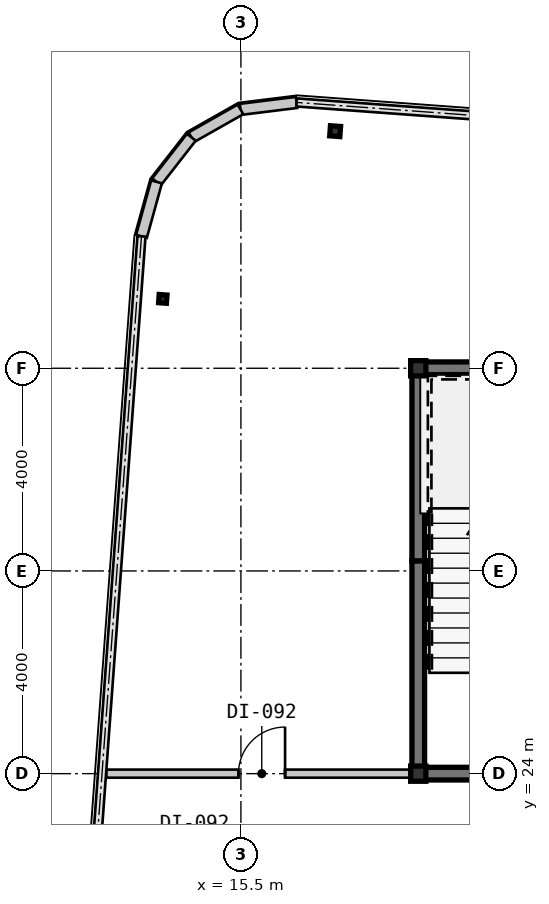
"""IFC4 building model, lengths in metres.
Left out: names, types, materials, properties, quantities, classifications, styles, units other than length and angle.
Written with IfcOpenShell. Run it as: python <this file> out.ifc"""

import sys

from ifc_helpers import new_model, si_unit, direction, frame, frame_2d, origin, origin_2d, place, context, subcontext, project, spatial, rectangle, hollow_rectangle, i_section, extrude, source, transform, mapped, element, fill, save


model = new_model("IFC4")
c1 = context("Model", 3, precision=1e-05, world=origin(), true_north=direction((0.0, 1.0)))
c2 = subcontext(c1, "Body", "Model", "MODEL_VIEW")
j1 = project(units=[si_unit("LENGTHUNIT", "METRE"), si_unit("PLANEANGLEUNIT", "RADIAN")], contexts=[c1])
p1 = place(None, origin())
s1 = spatial("IfcSite", under=j1, at=p1, CompositionType="ELEMENT")
p2 = place(p1, origin())
s2 = spatial("IfcBuilding", under=s1, at=p2, CompositionType="ELEMENT")
p3 = place(p2, frame((0.0, 0.0, 214.55)))
s3 = spatial("IfcBuildingStorey", under=s2, at=p3, CompositionType="ELEMENT", Elevation=214.55)
m1 = source(origin(), c2, "Body", "SweptSolid", [
    extrude(hollow_rectangle(XDim=0.3, YDim=0.3, WallThickness=0.012, at=origin_2d()), origin(), (0.0, 0.0, 1.0), 3.15),
])
for number, where, z_axis, x_axis in (
    (1, (19.0, 24.0, 0.0), (0.0, 0.0, 1.0), (1.0, 0.0, 0.0)),
    (2, (19.0, 32.0, 0.0), (0.0, 0.0, 1.0), (1.0, 0.0, 0.0)),
):
    element("IfcColumn", number, at=place(p3, frame(where, z_axis=z_axis, x_axis=x_axis)), inside=s3, PredefinedType="COLUMN", context=c2, shape_type="MappedRepresentation", body=[
        mapped(m1, transform((0.0, 0.0, 0.0), scale=1.0)),
    ])
m2 = source(origin(), c2, "Body", "SweptSolid", [
    extrude(hollow_rectangle(XDim=0.2, YDim=0.2, WallThickness=0.009, at=origin_2d()), origin(), (0.0, 0.0, 1.0), 3.15),
])
p4 = place(p3, frame((17.36, 36.679, 0.0), z_axis=(0.0, 0.0, 1.0), x_axis=(0.997314477224, -0.073238197128, 0.0)))
e3 = element("IfcColumn", 3, at=p4, inside=s3, PredefinedType="COLUMN", context=c2, shape_type="MappedRepresentation", body=[
    mapped(m2, transform((0.0, 0.0, 0.0), scale=1.0)),
])
m3 = source(origin(), c2, "Body", "SweptSolid", [
    extrude(i_section(OverallWidth=0.154, OverallDepth=0.162, WebThickness=0.008, FlangeThickness=0.011, at=origin_2d()), origin(), (0.0, 0.0, 1.0), 3.15),
])
p5 = place(p3, frame((13.958, 33.369, 0.0), z_axis=(0.0, 0.0, 1.0), x_axis=(0.997314477224, -0.073238197128, 0.0)))
e4 = element("IfcColumn", 4, at=p5, inside=s3, PredefinedType="COLUMN", context=c2, shape_type="MappedRepresentation", body=[
    mapped(m3, transform((0.0, 0.0, 0.0), scale=1.0)),
])
m4 = source(origin(), c2, "Body", "SweptSolid", [
    extrude(rectangle(XDim=1.116, YDim=0.22, at=frame_2d((0.558, 0.0))), origin(), (0.0, 0.0, 1.0), 2.93),
])
p6 = place(p3, frame((16.599, 37.246, 0.0), z_axis=(0.0, 0.0, 1.0), x_axis=(-0.992441899189, -0.122715429897, 0.0)))
e5 = element("IfcWall", 5, at=p6, inside=s3, PredefinedType="SOLIDWALL", context=c2, shape_type="MappedRepresentation", body=[
    mapped(m4, transform((0.0, 0.0, 0.0), scale=1.0)),
])
m5 = source(origin(), c2, "Body", "SweptSolid", [
    extrude(rectangle(XDim=1.116, YDim=0.22, at=frame_2d((0.558, 0.0))), origin(), (0.0, 0.0, 1.0), 2.93),
])
p7 = place(p3, frame((15.492, 37.109, 0.0), z_axis=(0.0, 0.0, 1.0), x_axis=(-0.869934579941, -0.493167138628, 0.0)))
e6 = element("IfcWall", 6, at=p7, inside=s3, PredefinedType="SOLIDWALL", context=c2, shape_type="MappedRepresentation", body=[
    mapped(m5, transform((0.0, 0.0, 0.0), scale=1.0)),
])
m6 = source(origin(), c2, "Body", "SweptSolid", [
    extrude(rectangle(XDim=1.116, YDim=0.22, at=frame_2d((0.558, 0.0))), origin(), (0.0, 0.0, 1.0), 2.93),
])
p8 = place(p3, frame((14.521, 36.559, 0.0), z_axis=(0.0, 0.0, 1.0), x_axis=(-0.614909386406, -0.788597772321, 0.0)))
e7 = element("IfcWall", 7, at=p8, inside=s3, PredefinedType="SOLIDWALL", context=c2, shape_type="MappedRepresentation", body=[
    mapped(m6, transform((0.0, 0.0, 0.0), scale=1.0)),
])
p9 = place(p3, frame((13.835, 35.679, 0.0), z_axis=(0.0, 0.0, 1.0), x_axis=(-0.266300605026, -0.963890028874, 0.0)))
e8 = element("IfcWall", 8, at=p9, inside=s3, PredefinedType="SOLIDWALL", context=c2, shape_type="MappedRepresentation", body=[
    mapped(m5, transform((0.0, 0.0, 0.0), scale=1.0)),
])
m7 = source(origin(), c2, "Body", "SweptSolid", [
    extrude(rectangle(XDim=9.125, YDim=0.25, at=frame_2d((4.562, 0.0))), origin(), (0.0, 0.0, 1.0), 2.93),
])
p10 = place(p3, frame((18.875, 32.0, 0.0), z_axis=(0.0, 0.0, 1.0), x_axis=(1.0, 0.0, 0.0)))
e9 = element("IfcWall", 9, at=p10, inside=s3, PredefinedType="SHEAR", context=c2, shape_type="MappedRepresentation", body=[
    mapped(m7, transform((0.0, 0.0, 0.0), scale=1.0)),
])
m8 = source(origin(), c2, "Body", "SweptSolid", [
    extrude(rectangle(XDim=4.075, YDim=0.25, at=frame_2d((2.038, 0.0))), origin(), (0.0, 0.0, 1.0), 2.93),
])
p11 = place(p3, frame((19.0, 24.125, 0.0), z_axis=(0.0, 0.0, 1.0), x_axis=(0.0, 1.0, 0.0)))
e10 = element("IfcWall", 10, at=p11, inside=s3, PredefinedType="SHEAR", context=c2, shape_type="MappedRepresentation", body=[
    mapped(m8, transform((0.0, 0.0, 0.0), scale=1.0)),
])
m9 = source(origin(), c2, "Body", "SweptSolid", [
    extrude(rectangle(XDim=3.675, YDim=0.25, at=frame_2d((1.837, 0.0))), origin(), (0.0, 0.0, 1.0), 2.93),
])
p12 = place(p3, frame((19.0, 28.2, 0.0), z_axis=(0.0, 0.0, 1.0), x_axis=(0.0, 1.0, 0.0)))
e11 = element("IfcWall", 11, at=p12, inside=s3, PredefinedType="SHEAR", context=c2, shape_type="MappedRepresentation", body=[
    mapped(m9, transform((0.0, 0.0, 0.0), scale=1.0)),
])
m10 = source(origin(), c2, "Body", "SweptSolid", [
    extrude(rectangle(XDim=4.85, YDim=0.25, at=frame_2d((2.425, 0.0))), origin(), (0.0, 0.0, 1.0), 2.93),
])
p13 = place(p3, frame((18.875, 24.0, 0.0), z_axis=(0.0, 0.0, 1.0), x_axis=(1.0, 0.0, 0.0)))
e12 = element("IfcWall", 12, at=p13, inside=s3, PredefinedType="SHEAR", context=c2, shape_type="MappedRepresentation", body=[
    mapped(m10, transform((0.0, 0.0, 0.0), scale=1.0)),
])
m11 = source(origin(), c2, "Body", "SweptSolid", [
    extrude(rectangle(XDim=6.032, YDim=0.16, at=frame_2d((3.016, 0.0))), origin(), (0.0, 0.0, 1.0), 2.93),
])
p14 = place(p3, frame((12.843, 24.0, 0.0), z_axis=(0.0, 0.0, 1.0), x_axis=(1.0, 0.0, 0.0)))
e13 = element("IfcWall", 13, at=p14, inside=s3, PredefinedType="PARTITIONING", context=c2, shape_type="MappedRepresentation", body=[
    mapped(m11, transform((0.0, 0.0, 0.0), scale=1.0)),
])
m12 = source(origin(), c2, "Body", "SweptSolid", [
    extrude(rectangle(XDim=0.92, YDim=2.1, at=frame_2d((0.46, 1.05))), frame((0.0, 0.09, 0.0), z_axis=(0.0, -1.0, 0.0), x_axis=(1.0, 0.0, 0.0)), (0.0, 0.0, 1.0), 0.18),
])
p15 = place(p14, frame((2.608, 0.0, 0.0)))
e14 = element("IfcOpeningElement", 14, at=p15, cuts=e13, PredefinedType="OPENING", context=c2, shape_type="MappedRepresentation", body=[
    mapped(m12, transform((0.0, 0.0, 0.0), scale=1.0)),
])
m13 = source(origin(), c2, "Body", "SweptSolid", [
    extrude(rectangle(XDim=0.92, YDim=2.1, at=frame_2d((0.46, 1.05))), frame((0.0, 0.025, 0.0), z_axis=(0.0, -1.0, 0.0), x_axis=(1.0, 0.0, 0.0)), (0.0, 0.0, 1.0), 0.05),
])
p16 = place(p15, origin())
e15 = element("IfcDoor", 15, at=p16, inside=s3, OperationType="SINGLE_SWING_RIGHT", PredefinedType="DOOR", context=c2, shape_type="MappedRepresentation", body=[
    mapped(m13, transform((0.0, 0.0, 0.0), scale=1.0)),
])
fill(e14, e15)
save(model, sys.argv[1])
